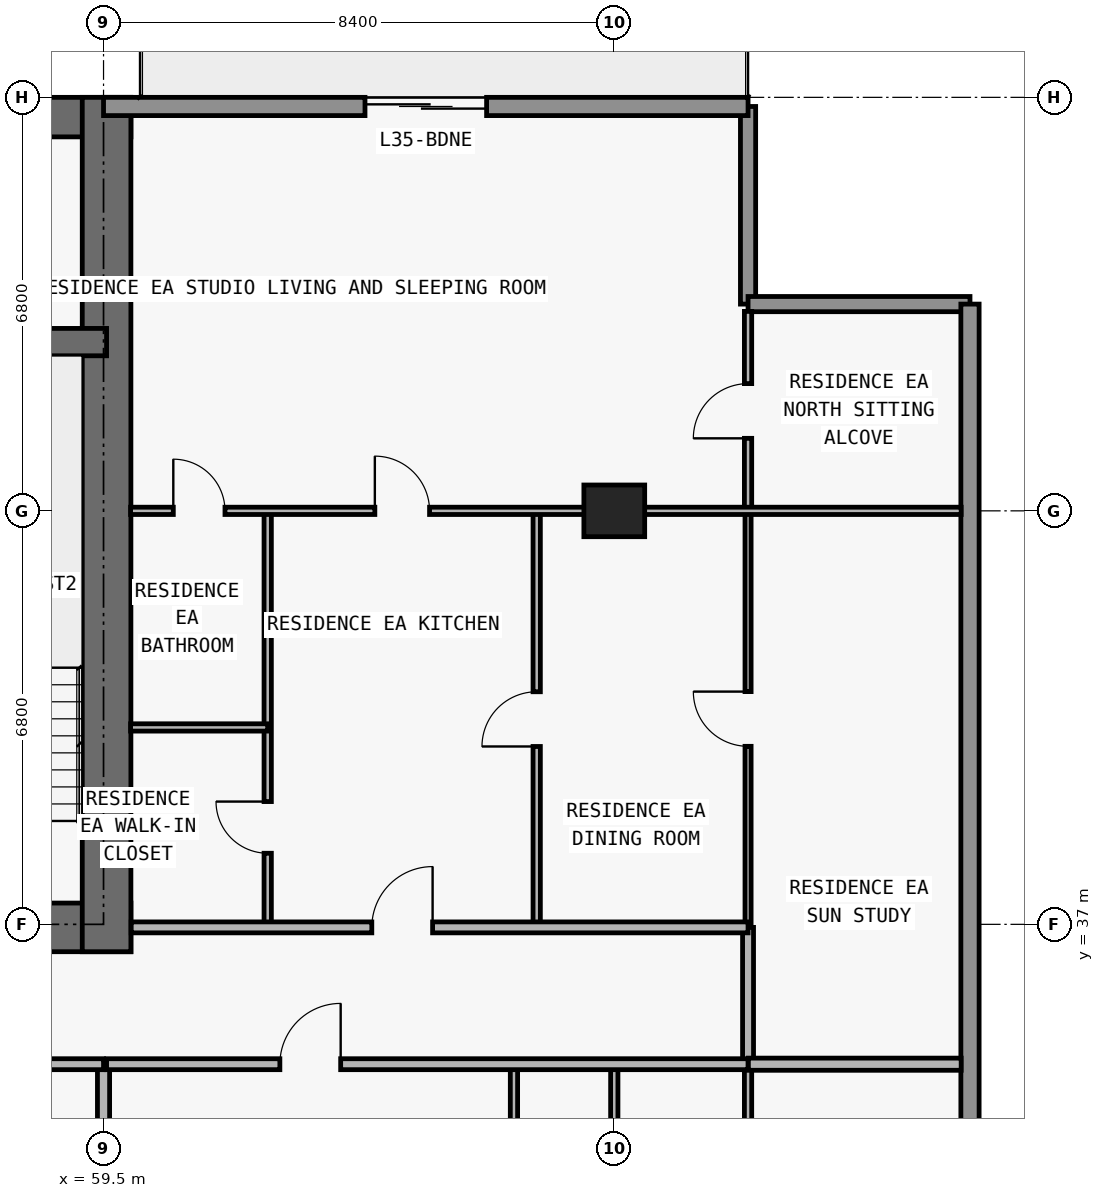
"""IFC4 building model, lengths in metres.
Left out: names, types, materials, properties, quantities, classifications, styles, units other than length and angle.
Written with IfcOpenShell. Run it as: python <this file> out.ifc"""

import sys

from ifc_helpers import new_model, si_unit, direction, frame, frame_2d, origin, origin_2d, place, context, subcontext, project, spatial, rectangle, extrude, element, fill, save


model = new_model("IFC4")
c1 = context("Model", 3, precision=1e-05, world=origin(), true_north=direction((0.0, 1.0)))
c2 = subcontext(c1, "Body", "Model", "MODEL_VIEW")
j1 = project(units=[si_unit("LENGTHUNIT", "METRE"), si_unit("PLANEANGLEUNIT", "RADIAN")], contexts=[c1])
p1 = place(None, origin())
s1 = spatial("IfcSite", under=j1, at=p1, CompositionType="ELEMENT")
p2 = place(p1, origin())
s2 = spatial("IfcBuilding", under=s1, at=p2, CompositionType="ELEMENT")
p3 = place(p2, frame((0.0, 0.0, 129.0)))
s3 = spatial("IfcBuildingStorey", under=s2, at=p3, CompositionType="ELEMENT", Elevation=129.0)
p4 = place(p3, frame((67.9, 43.8, 0.0), z_axis=(0.0, 0.0, 1.0), x_axis=(1.0, 0.0, 0.0)))
e1 = element("IfcColumn", 1, at=p4, inside=s3, PredefinedType="COLUMN", context=c2, shape_type="SweptSolid", body=[
    extrude(rectangle(XDim=1.0, YDim=0.85, at=origin_2d()), origin(), (0.0, 0.0, 1.0), 3.05),
])
p5 = place(p3, frame((17.85, 36.95, 0.0), z_axis=(0.0, 0.0, 1.0), x_axis=(1.0, 0.0, 0.0)))
e2 = element("IfcWall", 2, at=p5, inside=s3, PredefinedType="SHEAR", context=c2, shape_type="SweptSolid", body=[
    extrude(rectangle(XDim=42.1, YDim=0.8, at=frame_2d((21.05, 0.0))), origin(), (0.0, 0.0, 1.0), 3.05),
])
p6 = place(p5, frame((14.45, 0.0, 0.0)))
e3 = element("IfcOpeningElement", 3, at=p6, cuts=e2, PredefinedType="OPENING", context=c2, shape_type="SweptSolid", body=[
    extrude(rectangle(XDim=1.1, YDim=2.15, at=frame_2d((0.55, 1.075))), frame((0.0, 0.41, 0.0), z_axis=(0.0, -1.0, 0.0), x_axis=(1.0, 0.0, 0.0)), (0.0, 0.0, 1.0), 0.82),
])
p7 = place(p5, frame((6.3, 0.0, 0.0)))
e4 = element("IfcOpeningElement", 4, at=p7, cuts=e2, PredefinedType="OPENING", context=c2, shape_type="SweptSolid", body=[
    extrude(rectangle(XDim=1.05, YDim=2.15, at=frame_2d((0.525, 1.075))), frame((0.0, 0.41, 0.0), z_axis=(0.0, -1.0, 0.0), x_axis=(1.0, 0.0, 0.0)), (0.0, 0.0, 1.0), 0.82),
])
p8 = place(p5, frame((34.8, 0.0, 0.0)))
e5 = element("IfcOpeningElement", 5, at=p8, cuts=e2, PredefinedType="OPENING", context=c2, shape_type="SweptSolid", body=[
    extrude(rectangle(XDim=1.05, YDim=2.15, at=frame_2d((0.525, 1.075))), frame((0.0, 0.41, 0.0), z_axis=(0.0, -1.0, 0.0), x_axis=(1.0, 0.0, 0.0)), (0.0, 0.0, 1.0), 0.82),
])
p9 = place(p5, frame((10.913, 0.0, 0.0)))
e6 = element("IfcOpeningElement", 6, at=p9, cuts=e2, PredefinedType="OPENING", context=c2, shape_type="SweptSolid", body=[
    extrude(rectangle(XDim=1.05, YDim=2.15, at=frame_2d((0.525, 1.075))), frame((0.0, 0.41, 0.0), z_axis=(0.0, -1.0, 0.0), x_axis=(1.0, 0.0, 0.0)), (0.0, 0.0, 1.0), 0.82),
])
p10 = place(p5, frame((24.15, 0.0, 0.0)))
e7 = element("IfcOpeningElement", 7, at=p10, cuts=e2, PredefinedType="OPENING", context=c2, shape_type="SweptSolid", body=[
    extrude(rectangle(XDim=1.05, YDim=2.15, at=frame_2d((0.525, 1.075))), frame((0.0, 0.41, 0.0), z_axis=(0.0, -1.0, 0.0), x_axis=(1.0, 0.0, 0.0)), (0.0, 0.0, 1.0), 0.82),
])
p11 = place(p3, frame((17.85, 50.275, 0.0), z_axis=(0.0, 0.0, 1.0), x_axis=(1.0, 0.0, 0.0)))
e8 = element("IfcWall", 8, at=p11, inside=s3, PredefinedType="SHEAR", context=c2, shape_type="SweptSolid", body=[
    extrude(rectangle(XDim=42.1, YDim=0.65, at=frame_2d((21.05, 0.0))), origin(), (0.0, 0.0, 1.0), 3.05),
])
p12 = place(p3, frame((59.55, 36.55, 0.0), z_axis=(0.0, 0.0, 1.0), x_axis=(0.0, 1.0, 0.0)))
e9 = element("IfcWall", 9, at=p12, inside=s3, PredefinedType="SHEAR", context=c2, shape_type="SweptSolid", body=[
    extrude(rectangle(XDim=14.05, YDim=0.8, at=frame_2d((7.025, 0.0))), origin(), (0.0, 0.0, 1.0), 3.05),
])
p13 = place(p3, frame((18.25, 46.575, 0.0), z_axis=(0.0, 0.0, 1.0), x_axis=(1.0, 0.0, 0.0)))
e10 = element("IfcWall", 10, at=p13, inside=s3, PredefinedType="SHEAR", context=c2, shape_type="SweptSolid", body=[
    extrude(rectangle(XDim=41.3, YDim=0.45, at=frame_2d((20.65, 0.0))), origin(), (0.0, 0.0, 1.0), 3.05),
])
p14 = place(p13, frame((7.625, 0.0, 0.0)))
e11 = element("IfcOpeningElement", 11, at=p14, cuts=e10, PredefinedType="OPENING", context=c2, shape_type="SweptSolid", body=[
    extrude(rectangle(XDim=1.05, YDim=2.15, at=frame_2d((0.525, 1.075))), frame((0.0, 0.235, 0.0), z_axis=(0.0, -1.0, 0.0), x_axis=(1.0, 0.0, 0.0)), (0.0, 0.0, 1.0), 0.47),
])
p15 = place(p13, frame((32.675, 0.0, 0.0)))
e12 = element("IfcOpeningElement", 12, at=p15, cuts=e10, PredefinedType="OPENING", context=c2, shape_type="SweptSolid", body=[
    extrude(rectangle(XDim=1.05, YDim=2.15, at=frame_2d((0.525, 1.075))), frame((0.0, 0.235, 0.0), z_axis=(0.0, -1.0, 0.0), x_axis=(1.0, 0.0, 0.0)), (0.0, 0.0, 1.0), 0.47),
])
p16 = place(p3, frame((70.1, 50.45, 0.0), z_axis=(0.0, 0.0, 1.0), x_axis=(0.0, -1.0, 0.0)))
e13 = element("IfcWall", 13, at=p16, inside=s3, PredefinedType="ELEMENTEDWALL", context=c2, shape_type="SweptSolid", body=[
    extrude(rectangle(XDim=3.25, YDim=0.25, at=frame_2d((1.625, 0.0))), origin(), (0.0, 0.0, 1.0), 3.05),
])
p17 = place(p3, frame((70.1, 47.2, 0.0), z_axis=(0.0, 0.0, 1.0), x_axis=(1.0, 0.0, 0.0)))
e14 = element("IfcWall", 14, at=p17, inside=s3, PredefinedType="ELEMENTEDWALL", context=c2, shape_type="SweptSolid", body=[
    extrude(rectangle(XDim=3.65, YDim=0.25, at=frame_2d((1.825, 0.0))), origin(), (0.0, 0.0, 1.0), 3.05),
])
p18 = place(p3, frame((73.75, 47.2, 0.0), z_axis=(0.0, 0.0, 1.0), x_axis=(0.0, -1.0, 0.0)))
e15 = element("IfcWall", 15, at=p18, inside=s3, PredefinedType="STANDARD", context=c2, shape_type="SweptSolid", body=[
    extrude(rectangle(XDim=19.2, YDim=0.3, at=frame_2d((9.6, 0.0))), origin(), (0.0, 0.0, 1.0), 3.05),
])
p19 = place(p3, frame((59.5, 50.45, 0.0), z_axis=(0.0, 0.0, 1.0), x_axis=(1.0, 0.0, 0.0)))
e16 = element("IfcWall", 16, at=p19, inside=s3, PredefinedType="STANDARD", context=c2, shape_type="SweptSolid", body=[
    extrude(rectangle(XDim=10.6, YDim=0.3, at=frame_2d((5.3, 0.0))), origin(), (0.0, 0.0, 1.0), 3.05),
])
p20 = place(p19, frame((4.3, 0.0, 0.0)))
e17 = element("IfcOpeningElement", 17, at=p20, cuts=e16, PredefinedType="OPENING", context=c2, shape_type="SweptSolid", body=[
    extrude(rectangle(XDim=2.0, YDim=2.3, at=frame_2d((1.0, 1.15))), frame((0.0, 0.16, 0.0), z_axis=(0.0, -1.0, 0.0), x_axis=(1.0, 0.0, 0.0)), (0.0, 0.0, 1.0), 0.32),
])
p21 = place(p3, frame((59.5, 26.64, 0.0), z_axis=(0.0, 0.0, 1.0), x_axis=(0.0, 1.0, 0.0)))
e18 = element("IfcWall", 18, at=p21, inside=s3, PredefinedType="PARTITIONING", context=c2, shape_type="SweptSolid", body=[
    extrude(rectangle(XDim=8.06, YDim=0.2, at=frame_2d((4.03, 0.0))), origin(), (0.0, 0.0, 1.0), 2.174),
])
p22 = place(p3, frame((62.2, 36.95, 0.0), z_axis=(0.0, 0.0, 1.0), x_axis=(0.0, 1.0, 0.0)))
e19 = element("IfcWall", 19, at=p22, inside=s3, PredefinedType="PARTITIONING", context=c2, shape_type="SweptSolid", body=[
    extrude(rectangle(XDim=6.85, YDim=0.12, at=frame_2d((3.425, 0.0))), origin(), (0.0, 0.0, 1.0), 3.05),
])
p23 = place(p22, frame((1.219, 0.0, 0.0)))
e20 = element("IfcOpeningElement", 20, at=p23, cuts=e19, PredefinedType="OPENING", context=c2, shape_type="SweptSolid", body=[
    extrude(rectangle(XDim=0.85, YDim=2.1, at=frame_2d((0.425, 1.05))), frame((0.0, 0.07, 0.0), z_axis=(0.0, -1.0, 0.0), x_axis=(1.0, 0.0, 0.0)), (0.0, 0.0, 1.0), 0.14),
])
p24 = place(p3, frame((66.25, 26.64, 0.0), z_axis=(0.0, 0.0, 1.0), x_axis=(0.0, 1.0, 0.0)))
e21 = element("IfcWall", 21, at=p24, inside=s3, PredefinedType="PARTITIONING", context=c2, shape_type="SweptSolid", body=[
    extrude(rectangle(XDim=8.06, YDim=0.12, at=frame_2d((4.03, 0.0))), origin(), (0.0, 0.0, 1.0), 3.05),
])
p25 = place(p24, frame((3.755, 0.0, 0.0)))
e22 = element("IfcOpeningElement", 22, at=p25, cuts=e21, PredefinedType="OPENING", context=c2, shape_type="SweptSolid", body=[
    extrude(rectangle(XDim=0.85, YDim=2.1, at=frame_2d((0.425, 1.05))), frame((0.0, 0.07, 0.0), z_axis=(0.0, -1.0, 0.0), x_axis=(1.0, 0.0, 0.0)), (0.0, 0.0, 1.0), 0.14),
])
p26 = place(p3, frame((66.624, 36.95, 0.0), z_axis=(0.0, 0.0, 1.0), x_axis=(0.0, 1.0, 0.0)))
e23 = element("IfcWall", 23, at=p26, inside=s3, PredefinedType="PARTITIONING", context=c2, shape_type="SweptSolid", body=[
    extrude(rectangle(XDim=6.85, YDim=0.12, at=frame_2d((3.425, 0.0))), origin(), (0.0, 0.0, 1.0), 3.05),
])
p27 = place(p26, frame((2.975, 0.0, 0.0)))
e24 = element("IfcOpeningElement", 24, at=p27, cuts=e23, PredefinedType="OPENING", context=c2, shape_type="SweptSolid", body=[
    extrude(rectangle(XDim=0.9, YDim=2.15, at=frame_2d((0.45, 1.075))), frame((0.0, 0.07, 0.0), z_axis=(0.0, -1.0, 0.0), x_axis=(1.0, 0.0, 0.0)), (0.0, 0.0, 1.0), 0.14),
])
p28 = place(p3, frame((67.9, 26.64, 0.0), z_axis=(0.0, 0.0, 1.0), x_axis=(0.0, 1.0, 0.0)))
e25 = element("IfcWall", 25, at=p28, inside=s3, PredefinedType="PARTITIONING", context=c2, shape_type="SweptSolid", body=[
    extrude(rectangle(XDim=8.06, YDim=0.12, at=frame_2d((4.03, 0.0))), origin(), (0.0, 0.0, 1.0), 2.174),
])
p29 = place(p3, frame((70.1, 26.64, 0.0), z_axis=(0.0, 0.0, 1.0), x_axis=(0.0, 1.0, 0.0)))
e26 = element("IfcWall", 26, at=p29, inside=s3, PredefinedType="PARTITIONING", context=c2, shape_type="SweptSolid", body=[
    extrude(rectangle(XDim=8.06, YDim=0.12, at=frame_2d((4.03, 0.0))), origin(), (0.0, 0.0, 1.0), 3.05),
])
p30 = place(p3, frame((70.1, 34.705, 0.0), z_axis=(0.0, 0.0, 1.0), x_axis=(0.0, 1.0, 0.0)))
e27 = element("IfcWall", 27, at=p30, inside=s3, PredefinedType="PARTITIONING", context=c2, shape_type="SweptSolid", body=[
    extrude(rectangle(XDim=2.245, YDim=0.18, at=frame_2d((1.123, 0.0))), origin(), (0.0, 0.0, 1.0), 3.05),
])
p31 = place(p3, frame((70.1, 36.955, 0.0), z_axis=(0.0, 0.0, 1.0), x_axis=(0.0, 1.0, 0.0)))
e28 = element("IfcWall", 28, at=p31, inside=s3, PredefinedType="MOVABLE", context=c2, shape_type="SweptSolid", body=[
    extrude(rectangle(XDim=6.845, YDim=0.1, at=frame_2d((3.422, 0.0))), origin(), (0.0, 0.0, 1.0), 3.05),
])
p32 = place(p31, frame((2.972, 0.0, 0.0)))
e29 = element("IfcOpeningElement", 29, at=p32, cuts=e28, PredefinedType="OPENING", context=c2, shape_type="SweptSolid", body=[
    extrude(rectangle(XDim=0.9, YDim=2.15, at=frame_2d((0.45, 1.075))), frame((0.0, 0.06, 0.0), z_axis=(0.0, -1.0, 0.0), x_axis=(1.0, 0.0, 0.0)), (0.0, 0.0, 1.0), 0.12),
])
p33 = place(p3, frame((70.1, 43.805, 0.0), z_axis=(0.0, 0.0, 1.0), x_axis=(0.0, 1.0, 0.0)))
e30 = element("IfcWall", 30, at=p33, inside=s3, PredefinedType="PARTITIONING", context=c2, shape_type="SweptSolid", body=[
    extrude(rectangle(XDim=3.275, YDim=0.12, at=frame_2d((1.638, 0.0))), origin(), (0.0, 0.0, 1.0), 3.05),
])
p34 = place(p33, frame((1.188, 0.0, 0.0)))
e31 = element("IfcOpeningElement", 31, at=p34, cuts=e30, PredefinedType="OPENING", context=c2, shape_type="SweptSolid", body=[
    extrude(rectangle(XDim=0.9, YDim=2.15, at=frame_2d((0.45, 1.075))), frame((0.0, 0.07, 0.0), z_axis=(0.0, -1.0, 0.0), x_axis=(1.0, 0.0, 0.0)), (0.0, 0.0, 1.0), 0.14),
])
p35 = place(p3, frame((26.7, 34.7, 0.0), z_axis=(0.0, 0.0, 1.0), x_axis=(1.0, 0.0, 0.0)))
e32 = element("IfcWall", 32, at=p35, inside=s3, PredefinedType="PARTITIONING", context=c2, shape_type="SweptSolid", body=[
    extrude(rectangle(XDim=32.8, YDim=0.18, at=frame_2d((16.4, 0.0))), origin(), (0.0, 0.0, 1.0), 3.05),
])
p36 = place(p35, frame((2.875, 0.0, 0.0)))
e33 = element("IfcOpeningElement", 33, at=p36, cuts=e32, PredefinedType="OPENING", context=c2, shape_type="SweptSolid", body=[
    extrude(rectangle(XDim=1.0, YDim=2.2, at=frame_2d((0.5, 1.1))), frame((0.0, 0.1, 0.0), z_axis=(0.0, -1.0, 0.0), x_axis=(1.0, 0.0, 0.0)), (0.0, 0.0, 1.0), 0.2),
])
p37 = place(p35, frame((10.875, 0.0, 0.0)))
e34 = element("IfcOpeningElement", 34, at=p37, cuts=e32, PredefinedType="OPENING", context=c2, shape_type="SweptSolid", body=[
    extrude(rectangle(XDim=1.0, YDim=2.2, at=frame_2d((0.5, 1.1))), frame((0.0, 0.1, 0.0), z_axis=(0.0, -1.0, 0.0), x_axis=(1.0, 0.0, 0.0)), (0.0, 0.0, 1.0), 0.2),
])
p38 = place(p35, frame((18.875, 0.0, 0.0)))
e35 = element("IfcOpeningElement", 35, at=p38, cuts=e32, PredefinedType="OPENING", context=c2, shape_type="SweptSolid", body=[
    extrude(rectangle(XDim=1.0, YDim=2.2, at=frame_2d((0.5, 1.1))), frame((0.0, 0.1, 0.0), z_axis=(0.0, -1.0, 0.0), x_axis=(1.0, 0.0, 0.0)), (0.0, 0.0, 1.0), 0.2),
])
p39 = place(p35, frame((27.275, 0.0, 0.0)))
e36 = element("IfcOpeningElement", 36, at=p39, cuts=e32, PredefinedType="OPENING", context=c2, shape_type="SweptSolid", body=[
    extrude(rectangle(XDim=1.0, YDim=2.2, at=frame_2d((0.5, 1.1))), frame((0.0, 0.1, 0.0), z_axis=(0.0, -1.0, 0.0), x_axis=(1.0, 0.0, 0.0)), (0.0, 0.0, 1.0), 0.2),
])
p40 = place(p3, frame((59.55, 34.7, 0.0), z_axis=(0.0, 0.0, 1.0), x_axis=(1.0, 0.0, 0.0)))
e37 = element("IfcWall", 37, at=p40, inside=s3, PredefinedType="PARTITIONING", context=c2, shape_type="SweptSolid", body=[
    extrude(rectangle(XDim=10.55, YDim=0.18, at=frame_2d((5.275, 0.0))), origin(), (0.0, 0.0, 1.0), 3.05),
])
p41 = place(p40, frame((2.85, 0.0, 0.0)))
e38 = element("IfcOpeningElement", 38, at=p41, cuts=e37, PredefinedType="OPENING", context=c2, shape_type="SweptSolid", body=[
    extrude(rectangle(XDim=1.0, YDim=2.2, at=frame_2d((0.5, 1.1))), frame((0.0, 0.1, 0.0), z_axis=(0.0, -1.0, 0.0), x_axis=(1.0, 0.0, 0.0)), (0.0, 0.0, 1.0), 0.2),
])
p42 = place(p3, frame((70.105, 34.7, 0.0), z_axis=(0.0, 0.0, 1.0), x_axis=(1.0, 0.0, 0.0)))
e39 = element("IfcWall", 39, at=p42, inside=s3, PredefinedType="PARTITIONING", context=c2, shape_type="SweptSolid", body=[
    extrude(rectangle(XDim=3.5, YDim=0.2, at=frame_2d((1.75, 0.0))), origin(), (0.0, 0.0, 1.0), 3.05),
])
p43 = place(p3, frame((59.955, 36.95, 0.0), z_axis=(0.0, 0.0, 1.0), x_axis=(1.0, 0.0, 0.0)))
e40 = element("IfcWall", 40, at=p43, inside=s3, PredefinedType="PARTITIONING", context=c2, shape_type="SweptSolid", body=[
    extrude(rectangle(XDim=10.145, YDim=0.18, at=frame_2d((5.073, 0.0))), origin(), (0.0, 0.0, 1.0), 3.05),
])
p44 = place(p43, frame((3.957, 0.0, 0.0)))
e41 = element("IfcOpeningElement", 41, at=p44, cuts=e40, PredefinedType="OPENING", context=c2, shape_type="SweptSolid", body=[
    extrude(rectangle(XDim=1.0, YDim=2.2, at=frame_2d((0.5, 1.1))), frame((0.0, 0.1, 0.0), z_axis=(0.0, -1.0, 0.0), x_axis=(1.0, 0.0, 0.0)), (0.0, 0.0, 1.0), 0.2),
])
p45 = place(p3, frame((59.945, 40.238, 0.0), z_axis=(0.0, 0.0, 1.0), x_axis=(1.0, 0.0, 0.0)))
e42 = element("IfcWall", 42, at=p45, inside=s3, PredefinedType="PARTITIONING", context=c2, shape_type="SweptSolid", body=[
    extrude(rectangle(XDim=2.255, YDim=0.12, at=frame_2d((1.127, 0.0))), origin(), (0.0, 0.0, 1.0), 3.05),
])
p46 = place(p3, frame((59.945, 43.8, 0.0), z_axis=(0.0, 0.0, 1.0), x_axis=(1.0, 0.0, 0.0)))
e43 = element("IfcWall", 43, at=p46, inside=s3, PredefinedType="PARTITIONING", context=c2, shape_type="SweptSolid", body=[
    extrude(rectangle(XDim=13.66, YDim=0.12, at=frame_2d((6.83, 0.0))), origin(), (0.0, 0.0, 1.0), 2.339),
])
p47 = place(p46, frame((4.017, 0.0, 0.0)))
e44 = element("IfcOpeningElement", 44, at=p47, cuts=e43, PredefinedType="OPENING", context=c2, shape_type="SweptSolid", body=[
    extrude(rectangle(XDim=0.9, YDim=2.15, at=frame_2d((0.45, 1.075))), frame((0.0, 0.07, 0.0), z_axis=(0.0, -1.0, 0.0), x_axis=(1.0, 0.0, 0.0)), (0.0, 0.0, 1.0), 0.14),
])
p48 = place(p46, frame((0.702, 0.0, 0.0)))
e45 = element("IfcOpeningElement", 45, at=p48, cuts=e43, PredefinedType="OPENING", context=c2, shape_type="SweptSolid", body=[
    extrude(rectangle(XDim=0.85, YDim=2.1, at=frame_2d((0.425, 1.05))), frame((0.0, 0.07, 0.0), z_axis=(0.0, -1.0, 0.0), x_axis=(1.0, 0.0, 0.0)), (0.0, 0.0, 1.0), 0.14),
])
p49 = place(p20, origin())
e46 = element("IfcDoor", 46, at=p49, inside=s3, OperationType="DOUBLE_DOOR_SLIDING", PredefinedType="DOOR", context=c2, shape_type="SweptSolid", body=[
    extrude(rectangle(XDim=2.0, YDim=2.3, at=frame_2d((1.0, 1.15))), frame((0.0, 0.025, 0.0), z_axis=(0.0, -1.0, 0.0), x_axis=(1.0, 0.0, 0.0)), (0.0, 0.0, 1.0), 0.05),
])
fill(e17, e46)
p50 = place(p41, origin())
e47 = element("IfcDoor", 47, at=p50, inside=s3, OperationType="SINGLE_SWING_RIGHT", PredefinedType="DOOR", context=c2, shape_type="SweptSolid", body=[
    extrude(rectangle(XDim=1.0, YDim=2.2, at=frame_2d((0.5, 1.1))), frame((0.0, 0.025, 0.0), z_axis=(0.0, -1.0, 0.0), x_axis=(1.0, 0.0, 0.0)), (0.0, 0.0, 1.0), 0.05),
])
fill(e38, e47)
p51 = place(p27, origin())
e48 = element("IfcDoor", 48, at=p51, inside=s3, OperationType="SINGLE_SWING_LEFT", PredefinedType="DOOR", context=c2, shape_type="SweptSolid", body=[
    extrude(rectangle(XDim=0.9, YDim=2.15, at=frame_2d((0.45, 1.075))), frame((0.0, 0.025, 0.0), z_axis=(0.0, -1.0, 0.0), x_axis=(1.0, 0.0, 0.0)), (0.0, 0.0, 1.0), 0.05),
])
fill(e24, e48)
p52 = place(p44, origin())
e49 = element("IfcDoor", 49, at=p52, inside=s3, OperationType="SINGLE_SWING_RIGHT", PredefinedType="DOOR", context=c2, shape_type="SweptSolid", body=[
    extrude(rectangle(XDim=1.0, YDim=2.2, at=frame_2d((0.5, 1.1))), frame((0.0, 0.025, 0.0), z_axis=(0.0, -1.0, 0.0), x_axis=(1.0, 0.0, 0.0)), (0.0, 0.0, 1.0), 0.05),
])
fill(e41, e49)
p53 = place(p47, origin())
e50 = element("IfcDoor", 50, at=p53, inside=s3, OperationType="SINGLE_SWING_LEFT", PredefinedType="DOOR", context=c2, shape_type="SweptSolid", body=[
    extrude(rectangle(XDim=0.9, YDim=2.15, at=frame_2d((0.45, 1.075))), frame((0.0, 0.025, 0.0), z_axis=(0.0, -1.0, 0.0), x_axis=(1.0, 0.0, 0.0)), (0.0, 0.0, 1.0), 0.05),
])
fill(e44, e50)
p54 = place(p23, origin())
e51 = element("IfcDoor", 51, at=p54, inside=s3, OperationType="SINGLE_SWING_RIGHT", PredefinedType="DOOR", context=c2, shape_type="SweptSolid", body=[
    extrude(rectangle(XDim=0.85, YDim=2.1, at=frame_2d((0.425, 1.05))), frame((0.0, 0.025, 0.0), z_axis=(0.0, -1.0, 0.0), x_axis=(1.0, 0.0, 0.0)), (0.0, 0.0, 1.0), 0.05),
])
fill(e20, e51)
p55 = place(p48, origin())
e52 = element("IfcDoor", 52, at=p55, inside=s3, OperationType="SINGLE_SWING_LEFT", PredefinedType="DOOR", context=c2, shape_type="SweptSolid", body=[
    extrude(rectangle(XDim=0.85, YDim=2.1, at=frame_2d((0.425, 1.05))), frame((0.0, 0.025, 0.0), z_axis=(0.0, -1.0, 0.0), x_axis=(1.0, 0.0, 0.0)), (0.0, 0.0, 1.0), 0.05),
])
fill(e45, e52)
p56 = place(p32, origin())
e53 = element("IfcDoor", 53, at=p56, inside=s3, OperationType="SINGLE_SWING_RIGHT", PredefinedType="DOOR", context=c2, shape_type="SweptSolid", body=[
    extrude(rectangle(XDim=0.9, YDim=2.15, at=frame_2d((0.45, 1.075))), frame((0.0, 0.025, 0.0), z_axis=(0.0, -1.0, 0.0), x_axis=(1.0, 0.0, 0.0)), (0.0, 0.0, 1.0), 0.05),
])
fill(e29, e53)
p57 = place(p34, origin())
e54 = element("IfcDoor", 54, at=p57, inside=s3, OperationType="SINGLE_SWING_LEFT", PredefinedType="DOOR", context=c2, shape_type="SweptSolid", body=[
    extrude(rectangle(XDim=0.9, YDim=2.15, at=frame_2d((0.45, 1.075))), frame((0.0, 0.025, 0.0), z_axis=(0.0, -1.0, 0.0), x_axis=(1.0, 0.0, 0.0)), (0.0, 0.0, 1.0), 0.05),
])
fill(e31, e54)
save(model, sys.argv[1])
